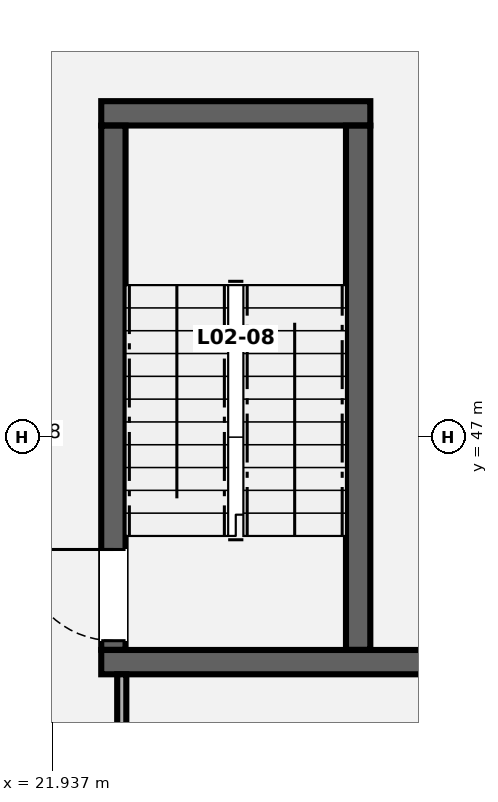
"""IFC4 building model, lengths in metres.
Left out: names, types, materials, properties, quantities, classifications, styles, units other than length and angle.
Written with IfcOpenShell. Run it as: python <this file> out.ifc"""

import sys

from ifc_helpers import new_model, si_unit, direction, frame, frame_2d, origin, place, context, subcontext, project, spatial, rectangle, extrude, element, fill, save


model = new_model("IFC4")
c1 = context("Model", 3, precision=1e-05, world=origin(), true_north=direction((0.0, 1.0)))
c2 = subcontext(c1, "Body", "Model", "MODEL_VIEW")
j1 = project(units=[si_unit("LENGTHUNIT", "METRE"), si_unit("PLANEANGLEUNIT", "RADIAN")], contexts=[c1])
p1 = place(None, origin())
s1 = spatial("IfcSite", under=j1, at=p1, CompositionType="ELEMENT")
p2 = place(p1, origin())
s2 = spatial("IfcBuilding", under=s1, at=p2, CompositionType="ELEMENT")
p3 = place(p2, frame((0.0, 0.0, 9.1)))
s3 = spatial("IfcBuildingStorey", under=s2, at=p3, CompositionType="ELEMENT", Elevation=9.1)
p4 = place(p3, frame((22.58, 44.04, 0.0), z_axis=(0.0, 0.0, 1.0), x_axis=(1.0, 0.0, 0.0)))
e1 = element("IfcWall", 1, at=p4, inside=s3, PredefinedType="SHEAR", context=c2, shape_type="SweptSolid", body=[
    extrude(rectangle(XDim=4.485, YDim=0.32, at=frame_2d((2.242, 0.0))), origin(), (0.0, 0.0, 1.0), 4.0),
])
p5 = place(p3, frame((22.58, 51.26, 0.0), z_axis=(0.0, 0.0, 1.0), x_axis=(1.0, 0.0, 0.0)))
e2 = element("IfcWall", 2, at=p5, inside=s3, PredefinedType="SHEAR", context=c2, shape_type="SweptSolid", body=[
    extrude(rectangle(XDim=3.54, YDim=0.32, at=frame_2d((1.77, 0.0))), origin(), (0.0, 0.0, 1.0), 4.0),
])
p6 = place(p3, frame((22.74, 44.202, 0.0), z_axis=(0.0, 0.0, 1.0), x_axis=(0.0, 1.0, 0.0)))
e3 = element("IfcWall", 3, at=p6, inside=s3, PredefinedType="SHEAR", context=c2, shape_type="SweptSolid", body=[
    extrude(rectangle(XDim=6.896, YDim=0.32, at=frame_2d((3.448, 0.0))), origin(), (0.0, 0.0, 1.0), 4.0),
])
p7 = place(p6, frame((0.12, 0.0, 0.0)))
e4 = element("IfcOpeningElement", 4, at=p7, cuts=e3, PredefinedType="OPENING", context=c2, shape_type="SweptSolid", body=[
    extrude(rectangle(XDim=1.2, YDim=2.15, at=frame_2d((0.6, 1.075))), frame((0.0, 0.17, 0.0), z_axis=(0.0, -1.0, 0.0), x_axis=(1.0, 0.0, 0.0)), (0.0, 0.0, 1.0), 0.34),
])
p8 = place(p3, frame((25.96, 44.202, 0.0), z_axis=(0.0, 0.0, 1.0), x_axis=(0.0, 1.0, 0.0)))
e5 = element("IfcWall", 5, at=p8, inside=s3, PredefinedType="SHEAR", context=c2, shape_type="SweptSolid", body=[
    extrude(rectangle(XDim=6.896, YDim=0.32, at=frame_2d((3.448, 0.0))), origin(), (0.0, 0.0, 1.0), 4.0),
])
p9 = place(p3, frame((22.85, 31.2, 0.0), z_axis=(0.0, 0.0, 1.0), x_axis=(0.0, 1.0, 0.0)))
e6 = element("IfcWall", 6, at=p9, inside=s3, PredefinedType="PARTITIONING", context=c2, shape_type="SweptSolid", body=[
    extrude(rectangle(XDim=12.68, YDim=0.12, at=frame_2d((6.34, 0.0))), origin(), (0.0, 0.0, 1.0), 4.0),
])
p10 = place(p9, frame((5.54, 0.0, 0.0)))
e7 = element("IfcOpeningElement", 7, at=p10, cuts=e6, PredefinedType="OPENING", context=c2, shape_type="SweptSolid", body=[
    extrude(rectangle(XDim=1.6, YDim=2.18, at=frame_2d((0.8, 1.09))), frame((0.0, 0.07, 0.0), z_axis=(0.0, -1.0, 0.0), x_axis=(1.0, 0.0, 0.0)), (0.0, 0.0, 1.0), 0.14),
])
p11 = place(p7, origin())
e8 = element("IfcDoor", 8, at=p11, inside=s3, OperationType="SINGLE_SWING_RIGHT", PredefinedType="DOOR", context=c2, shape_type="SweptSolid", body=[
    extrude(rectangle(XDim=1.2, YDim=2.15, at=frame_2d((0.6, 1.075))), frame((0.0, 0.025, 0.0), z_axis=(0.0, -1.0, 0.0), x_axis=(1.0, 0.0, 0.0)), (0.0, 0.0, 1.0), 0.05),
])
fill(e4, e8)
save(model, sys.argv[1])
